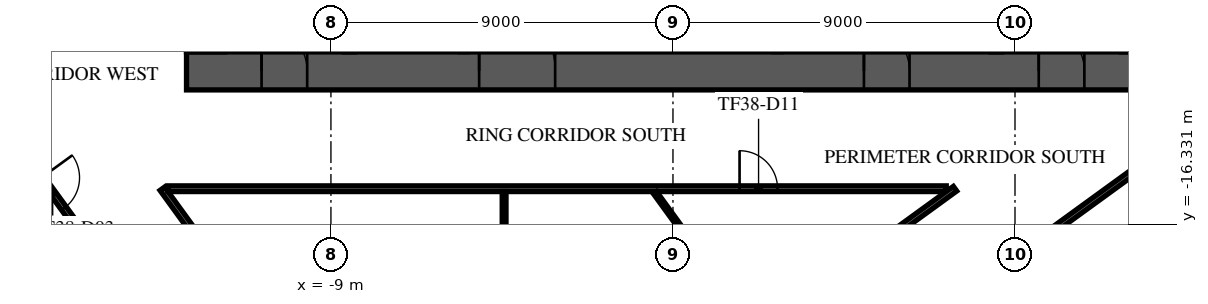
"""IFC4 building model, lengths in metres.
Left out: names, types, materials, properties, quantities, classifications, styles, units other than length and angle.
Written with IfcOpenShell. Run it as: python <this file> out.ifc"""

import sys

from ifc_helpers import new_model, si_unit, direction, frame, frame_2d, origin, place, context, subcontext, project, spatial, rectangle, extrude, element, fill, save


model = new_model("IFC4")
c1 = context("Model", 3, precision=1e-05, world=origin(), true_north=direction((0.0, 1.0)))
c2 = subcontext(c1, "Body", "Model", "MODEL_VIEW")
j1 = project(units=[si_unit("LENGTHUNIT", "METRE"), si_unit("PLANEANGLEUNIT", "RADIAN")], contexts=[c1])
p1 = place(None, origin())
s1 = spatial("IfcSite", under=j1, at=p1, CompositionType="ELEMENT")
p2 = place(p1, origin())
s2 = spatial("IfcBuilding", under=s1, at=p2, CompositionType="ELEMENT")
p3 = place(p2, frame((0.0, 0.0, 163.7)))
s3 = spatial("IfcBuildingStorey", under=s2, at=p3, CompositionType="ELEMENT", Elevation=163.7)
p4 = place(p3, frame((-12.8, -12.3, 0.0), z_axis=(0.0, 0.0, 1.0), x_axis=(1.0, 0.0, 0.0)))
e1 = element("IfcWall", 1, at=p4, inside=s3, PredefinedType="SHEAR", context=c2, shape_type="SweptSolid", body=[
    extrude(rectangle(XDim=25.6, YDim=1.0, at=frame_2d((12.8, 0.0))), origin(), (0.0, 0.0, 1.0), 3.6),
])
p5 = place(p4, frame((7.7, 0.0, 0.0)))
e2 = element("IfcOpeningElement", 2, at=p5, cuts=e1, PredefinedType="OPENING", context=c2, shape_type="SweptSolid", body=[
    extrude(rectangle(XDim=2.0, YDim=2.1, at=frame_2d((1.0, 1.05))), frame((0.0, 0.51, 0.0), z_axis=(0.0, -1.0, 0.0), x_axis=(1.0, 0.0, 0.0)), (0.0, 0.0, 1.0), 1.02),
])
p6 = place(p4, frame((17.825, 0.0, 0.0)))
e3 = element("IfcOpeningElement", 3, at=p6, cuts=e1, PredefinedType="OPENING", context=c2, shape_type="SweptSolid", body=[
    extrude(rectangle(XDim=1.2, YDim=2.1, at=frame_2d((0.6, 1.05))), frame((0.0, 0.51, 0.0), z_axis=(0.0, -1.0, 0.0), x_axis=(1.0, 0.0, 0.0)), (0.0, 0.0, 1.0), 1.02),
])
p7 = place(p4, frame((1.975, 0.0, 0.0)))
e4 = element("IfcOpeningElement", 4, at=p7, cuts=e1, PredefinedType="OPENING", context=c2, shape_type="SweptSolid", body=[
    extrude(rectangle(XDim=1.2, YDim=2.1, at=frame_2d((0.6, 1.05))), frame((0.0, 0.51, 0.0), z_axis=(0.0, -1.0, 0.0), x_axis=(1.0, 0.0, 0.0)), (0.0, 0.0, 1.0), 1.02),
])
p8 = place(p4, frame((22.425, 0.0, 0.0)))
e5 = element("IfcOpeningElement", 5, at=p8, cuts=e1, PredefinedType="OPENING", context=c2, shape_type="SweptSolid", body=[
    extrude(rectangle(XDim=1.2, YDim=2.1, at=frame_2d((0.6, 1.05))), frame((0.0, 0.51, 0.0), z_axis=(0.0, -1.0, 0.0), x_axis=(1.0, 0.0, 0.0)), (0.0, 0.0, 1.0), 1.02),
])
p9 = place(p3, frame((-36.533, -0.245, 0.0), z_axis=(0.0, 0.0, 1.0), x_axis=(0.587787495615, -0.809015364501, 0.0)))
e6 = element("IfcWall", 6, at=p9, inside=s3, PredefinedType="STANDARD", context=c2, shape_type="SweptSolid", body=[
    extrude(rectangle(XDim=42.552, YDim=0.6, at=frame_2d((21.276, 0.0))), origin(), (0.0, 0.0, 1.0), 3.6),
])
p10 = place(p9, frame((1.178, 0.0, 0.9)))
e7 = element("IfcOpeningElement", 7, at=p10, cuts=e6, PredefinedType="OPENING", context=c2, shape_type="SweptSolid", body=[
    extrude(rectangle(XDim=1.8, YDim=2.1, at=frame_2d((0.9, 1.05))), frame((0.0, 0.31, 0.0), z_axis=(0.0, -1.0, 0.0), x_axis=(1.0, 0.0, 0.0)), (0.0, 0.0, 1.0), 0.62),
])
p11 = place(p9, frame((5.396, 0.0, 0.9)))
e8 = element("IfcOpeningElement", 8, at=p11, cuts=e6, PredefinedType="OPENING", context=c2, shape_type="SweptSolid", body=[
    extrude(rectangle(XDim=1.8, YDim=2.1, at=frame_2d((0.9, 1.05))), frame((0.0, 0.31, 0.0), z_axis=(0.0, -1.0, 0.0), x_axis=(1.0, 0.0, 0.0)), (0.0, 0.0, 1.0), 0.62),
])
p12 = place(p9, frame((9.676, 0.0, 0.9)))
e9 = element("IfcOpeningElement", 9, at=p12, cuts=e6, PredefinedType="OPENING", context=c2, shape_type="SweptSolid", body=[
    extrude(rectangle(XDim=1.8, YDim=2.1, at=frame_2d((0.9, 1.05))), frame((0.0, 0.31, 0.0), z_axis=(0.0, -1.0, 0.0), x_axis=(1.0, 0.0, 0.0)), (0.0, 0.0, 1.0), 0.62),
])
p13 = place(p9, frame((13.956, 0.0, 0.9)))
e10 = element("IfcOpeningElement", 10, at=p13, cuts=e6, PredefinedType="OPENING", context=c2, shape_type="SweptSolid", body=[
    extrude(rectangle(XDim=1.8, YDim=2.1, at=frame_2d((0.9, 1.05))), frame((0.0, 0.31, 0.0), z_axis=(0.0, -1.0, 0.0), x_axis=(1.0, 0.0, 0.0)), (0.0, 0.0, 1.0), 0.62),
])
p14 = place(p9, frame((18.236, 0.0, 0.9)))
e11 = element("IfcOpeningElement", 11, at=p14, cuts=e6, PredefinedType="OPENING", context=c2, shape_type="SweptSolid", body=[
    extrude(rectangle(XDim=1.8, YDim=2.1, at=frame_2d((0.9, 1.05))), frame((0.0, 0.31, 0.0), z_axis=(0.0, -1.0, 0.0), x_axis=(1.0, 0.0, 0.0)), (0.0, 0.0, 1.0), 0.62),
])
p15 = place(p9, frame((22.516, 0.0, 0.9)))
e12 = element("IfcOpeningElement", 12, at=p15, cuts=e6, PredefinedType="OPENING", context=c2, shape_type="SweptSolid", body=[
    extrude(rectangle(XDim=1.8, YDim=2.1, at=frame_2d((0.9, 1.05))), frame((0.0, 0.31, 0.0), z_axis=(0.0, -1.0, 0.0), x_axis=(1.0, 0.0, 0.0)), (0.0, 0.0, 1.0), 0.62),
])
p16 = place(p9, frame((26.796, 0.0, 0.9)))
e13 = element("IfcOpeningElement", 13, at=p16, cuts=e6, PredefinedType="OPENING", context=c2, shape_type="SweptSolid", body=[
    extrude(rectangle(XDim=1.8, YDim=2.1, at=frame_2d((0.9, 1.05))), frame((0.0, 0.31, 0.0), z_axis=(0.0, -1.0, 0.0), x_axis=(1.0, 0.0, 0.0)), (0.0, 0.0, 1.0), 0.62),
])
p17 = place(p9, frame((31.076, 0.0, 0.9)))
e14 = element("IfcOpeningElement", 14, at=p17, cuts=e6, PredefinedType="OPENING", context=c2, shape_type="SweptSolid", body=[
    extrude(rectangle(XDim=1.8, YDim=2.1, at=frame_2d((0.9, 1.05))), frame((0.0, 0.31, 0.0), z_axis=(0.0, -1.0, 0.0), x_axis=(1.0, 0.0, 0.0)), (0.0, 0.0, 1.0), 0.62),
])
p18 = place(p9, frame((35.356, 0.0, 0.9)))
e15 = element("IfcOpeningElement", 15, at=p18, cuts=e6, PredefinedType="OPENING", context=c2, shape_type="SweptSolid", body=[
    extrude(rectangle(XDim=1.8, YDim=2.1, at=frame_2d((0.9, 1.05))), frame((0.0, 0.31, 0.0), z_axis=(0.0, -1.0, 0.0), x_axis=(1.0, 0.0, 0.0)), (0.0, 0.0, 1.0), 0.62),
])
p19 = place(p9, frame((39.573, 0.0, 0.9)))
e16 = element("IfcOpeningElement", 16, at=p19, cuts=e6, PredefinedType="OPENING", context=c2, shape_type="SweptSolid", body=[
    extrude(rectangle(XDim=1.8, YDim=2.1, at=frame_2d((0.9, 1.05))), frame((0.0, 0.31, 0.0), z_axis=(0.0, -1.0, 0.0), x_axis=(1.0, 0.0, 0.0)), (0.0, 0.0, 1.0), 0.62),
])
p20 = place(p3, frame((-4.784, -35.737, 0.0), z_axis=(0.0, 0.0, 1.0), x_axis=(0.809019283075, 0.587782102154, 0.0)))
e17 = element("IfcWall", 17, at=p20, inside=s3, PredefinedType="STANDARD", context=c2, shape_type="SweptSolid", body=[
    extrude(rectangle(XDim=49.751, YDim=0.6, at=frame_2d((24.875, 0.0))), origin(), (0.0, 0.0, 1.0), 3.6),
])
p21 = place(p20, frame((1.161, 0.0, 0.9)))
e18 = element("IfcOpeningElement", 18, at=p21, cuts=e17, PredefinedType="OPENING", context=c2, shape_type="SweptSolid", body=[
    extrude(rectangle(XDim=2.1, YDim=2.1, at=frame_2d((1.05, 1.05))), frame((0.0, 0.31, 0.0), z_axis=(0.0, -1.0, 0.0), x_axis=(1.0, 0.0, 0.0)), (0.0, 0.0, 1.0), 0.62),
])
p22 = place(p20, frame((5.644, 0.0, 0.9)))
e19 = element("IfcOpeningElement", 19, at=p22, cuts=e17, PredefinedType="OPENING", context=c2, shape_type="SweptSolid", body=[
    extrude(rectangle(XDim=2.1, YDim=2.1, at=frame_2d((1.05, 1.05))), frame((0.0, 0.31, 0.0), z_axis=(0.0, -1.0, 0.0), x_axis=(1.0, 0.0, 0.0)), (0.0, 0.0, 1.0), 0.62),
])
p23 = place(p20, frame((10.189, 0.0, 0.9)))
e20 = element("IfcOpeningElement", 20, at=p23, cuts=e17, PredefinedType="OPENING", context=c2, shape_type="SweptSolid", body=[
    extrude(rectangle(XDim=2.1, YDim=2.1, at=frame_2d((1.05, 1.05))), frame((0.0, 0.31, 0.0), z_axis=(0.0, -1.0, 0.0), x_axis=(1.0, 0.0, 0.0)), (0.0, 0.0, 1.0), 0.62),
])
p24 = place(p20, frame((14.735, 0.0, 0.9)))
e21 = element("IfcOpeningElement", 21, at=p24, cuts=e17, PredefinedType="OPENING", context=c2, shape_type="SweptSolid", body=[
    extrude(rectangle(XDim=2.1, YDim=2.1, at=frame_2d((1.05, 1.05))), frame((0.0, 0.31, 0.0), z_axis=(0.0, -1.0, 0.0), x_axis=(1.0, 0.0, 0.0)), (0.0, 0.0, 1.0), 0.62),
])
p25 = place(p20, frame((19.28, 0.0, 0.9)))
e22 = element("IfcOpeningElement", 22, at=p25, cuts=e17, PredefinedType="OPENING", context=c2, shape_type="SweptSolid", body=[
    extrude(rectangle(XDim=2.1, YDim=2.1, at=frame_2d((1.05, 1.05))), frame((0.0, 0.31, 0.0), z_axis=(0.0, -1.0, 0.0), x_axis=(1.0, 0.0, 0.0)), (0.0, 0.0, 1.0), 0.62),
])
p26 = place(p20, frame((23.826, 0.0, 0.9)))
e23 = element("IfcOpeningElement", 23, at=p26, cuts=e17, PredefinedType="OPENING", context=c2, shape_type="SweptSolid", body=[
    extrude(rectangle(XDim=2.1, YDim=2.1, at=frame_2d((1.05, 1.05))), frame((0.0, 0.31, 0.0), z_axis=(0.0, -1.0, 0.0), x_axis=(1.0, 0.0, 0.0)), (0.0, 0.0, 1.0), 0.62),
])
p27 = place(p20, frame((28.371, 0.0, 0.9)))
e24 = element("IfcOpeningElement", 24, at=p27, cuts=e17, PredefinedType="OPENING", context=c2, shape_type="SweptSolid", body=[
    extrude(rectangle(XDim=2.1, YDim=2.1, at=frame_2d((1.05, 1.05))), frame((0.0, 0.31, 0.0), z_axis=(0.0, -1.0, 0.0), x_axis=(1.0, 0.0, 0.0)), (0.0, 0.0, 1.0), 0.62),
])
p28 = place(p20, frame((32.917, 0.0, 0.9)))
e25 = element("IfcOpeningElement", 25, at=p28, cuts=e17, PredefinedType="OPENING", context=c2, shape_type="SweptSolid", body=[
    extrude(rectangle(XDim=2.1, YDim=2.1, at=frame_2d((1.05, 1.05))), frame((0.0, 0.31, 0.0), z_axis=(0.0, -1.0, 0.0), x_axis=(1.0, 0.0, 0.0)), (0.0, 0.0, 1.0), 0.62),
])
p29 = place(p20, frame((37.462, 0.0, 0.9)))
e26 = element("IfcOpeningElement", 26, at=p29, cuts=e17, PredefinedType="OPENING", context=c2, shape_type="SweptSolid", body=[
    extrude(rectangle(XDim=2.1, YDim=2.1, at=frame_2d((1.05, 1.05))), frame((0.0, 0.31, 0.0), z_axis=(0.0, -1.0, 0.0), x_axis=(1.0, 0.0, 0.0)), (0.0, 0.0, 1.0), 0.62),
])
p30 = place(p20, frame((42.008, 0.0, 0.9)))
e27 = element("IfcOpeningElement", 27, at=p30, cuts=e17, PredefinedType="OPENING", context=c2, shape_type="SweptSolid", body=[
    extrude(rectangle(XDim=2.1, YDim=2.1, at=frame_2d((1.05, 1.05))), frame((0.0, 0.31, 0.0), z_axis=(0.0, -1.0, 0.0), x_axis=(1.0, 0.0, 0.0)), (0.0, 0.0, 1.0), 0.62),
])
p31 = place(p20, frame((46.491, 0.0, 0.9)))
e28 = element("IfcOpeningElement", 28, at=p31, cuts=e17, PredefinedType="OPENING", context=c2, shape_type="SweptSolid", body=[
    extrude(rectangle(XDim=2.1, YDim=2.1, at=frame_2d((1.05, 1.05))), frame((0.0, 0.31, 0.0), z_axis=(0.0, -1.0, 0.0), x_axis=(1.0, 0.0, 0.0)), (0.0, 0.0, 1.0), 0.62),
])
p32 = place(p3, frame((-26.437, -1.589, 0.0), z_axis=(0.0, 0.0, 1.0), x_axis=(0.587768879666, -0.809028889531, 0.0)))
e29 = element("IfcWall", 29, at=p32, inside=s3, PredefinedType="PARTITIONING", context=c2, shape_type="SweptSolid", body=[
    extrude(rectangle(XDim=28.583, YDim=0.15, at=frame_2d((14.292, 0.0))), origin(), (0.0, 0.0, 1.0), 3.15),
])
p33 = place(p32, frame((16.711, 0.0, 0.0)))
e30 = element("IfcOpeningElement", 30, at=p33, cuts=e29, PredefinedType="OPENING", context=c2, shape_type="SweptSolid", body=[
    extrude(rectangle(XDim=1.0, YDim=2.1, at=frame_2d((0.5, 1.05))), frame((0.0, 0.085, 0.0), z_axis=(0.0, -1.0, 0.0), x_axis=(1.0, 0.0, 0.0)), (0.0, 0.0, 1.0), 0.17),
])
p34 = place(p3, frame((-13.436, -15.4, 0.0), z_axis=(0.0, 0.0, 1.0), x_axis=(0.58776885963, -0.809028904088, 0.0)))
e31 = element("IfcWall", 31, at=p34, inside=s3, PredefinedType="PARTITIONING", context=c2, shape_type="SweptSolid", body=[
    extrude(rectangle(XDim=9.767, YDim=0.15, at=frame_2d((4.884, 0.0))), origin(), (0.0, 0.0, 1.0), 3.15),
])
p35 = place(p34, frame((4.3, 0.0, 0.0)))
e32 = element("IfcOpeningElement", 32, at=p35, cuts=e31, PredefinedType="OPENING", context=c2, shape_type="SweptSolid", body=[
    extrude(rectangle(XDim=1.8, YDim=2.1, at=frame_2d((0.9, 1.05))), frame((0.0, 0.085, 0.0), z_axis=(0.0, -1.0, 0.0), x_axis=(1.0, 0.0, 0.0)), (0.0, 0.0, 1.0), 0.17),
])
p36 = place(p3, frame((-13.289, -15.4, 0.0), z_axis=(0.0, 0.0, 1.0), x_axis=(1.0, 0.0, 0.0)))
e33 = element("IfcWall", 33, at=p36, inside=s3, PredefinedType="PARTITIONING", context=c2, shape_type="SweptSolid", body=[
    extrude(rectangle(XDim=20.48, YDim=0.15, at=frame_2d((10.24, 0.0))), origin(), (0.0, 0.0, 1.0), 3.15),
])
p37 = place(p36, frame((15.041, 0.0, 0.0)))
e34 = element("IfcOpeningElement", 34, at=p37, cuts=e33, PredefinedType="OPENING", context=c2, shape_type="SweptSolid", body=[
    extrude(rectangle(XDim=1.0, YDim=2.1, at=frame_2d((0.5, 1.05))), frame((0.0, 0.085, 0.0), z_axis=(0.0, -1.0, 0.0), x_axis=(1.0, 0.0, 0.0)), (0.0, 0.0, 1.0), 0.17),
])
p38 = place(p3, frame((-4.98, -24.411, 0.0), z_axis=(0.0, 0.0, 1.0), x_axis=(0.809006648498, 0.587799491907, 0.0)))
e35 = element("IfcWall", 35, at=p38, inside=s3, PredefinedType="PARTITIONING", context=c2, shape_type="SweptSolid", body=[
    extrude(rectangle(XDim=15.33, YDim=0.15, at=frame_2d((7.665, 0.0))), origin(), (0.0, 0.0, 1.0), 3.15),
])
p39 = place(p38, frame((7.464, 0.0, 0.0)))
e36 = element("IfcOpeningElement", 36, at=p39, cuts=e35, PredefinedType="OPENING", context=c2, shape_type="SweptSolid", body=[
    extrude(rectangle(XDim=1.0, YDim=2.1, at=frame_2d((0.5, 1.05))), frame((0.0, 0.085, 0.0), z_axis=(0.0, -1.0, 0.0), x_axis=(1.0, 0.0, 0.0)), (0.0, 0.0, 1.0), 0.17),
])
p40 = place(p3, frame((-3.509, -26.309, 0.0), z_axis=(0.0, 0.0, 1.0), x_axis=(0.809024097608, 0.587775475407, 0.0)))
e37 = element("IfcWall", 37, at=p40, inside=s3, PredefinedType="PARTITIONING", context=c2, shape_type="SweptSolid", body=[
    extrude(rectangle(XDim=36.68, YDim=0.15, at=frame_2d((18.34, 0.0))), origin(), (0.0, 0.0, 1.0), 3.15),
])
p41 = place(p40, frame((5.361, 0.0, 0.0)))
e38 = element("IfcOpeningElement", 38, at=p41, cuts=e37, PredefinedType="OPENING", context=c2, shape_type="SweptSolid", body=[
    extrude(rectangle(XDim=1.0, YDim=2.1, at=frame_2d((0.5, 1.05))), frame((0.0, 0.085, 0.0), z_axis=(0.0, -1.0, 0.0), x_axis=(1.0, 0.0, 0.0)), (0.0, 0.0, 1.0), 0.17),
])
p42 = place(p40, frame((12.913, 0.0, 0.0)))
e39 = element("IfcOpeningElement", 39, at=p42, cuts=e37, PredefinedType="OPENING", context=c2, shape_type="SweptSolid", body=[
    extrude(rectangle(XDim=1.0, YDim=2.1, at=frame_2d((0.5, 1.05))), frame((0.0, 0.085, 0.0), z_axis=(0.0, -1.0, 0.0), x_axis=(1.0, 0.0, 0.0)), (0.0, 0.0, 1.0), 0.17),
])
p43 = place(p40, frame((27.576, 0.0, 0.0)))
e40 = element("IfcOpeningElement", 40, at=p43, cuts=e37, PredefinedType="OPENING", context=c2, shape_type="SweptSolid", body=[
    extrude(rectangle(XDim=1.0, YDim=2.1, at=frame_2d((0.5, 1.05))), frame((0.0, 0.085, 0.0), z_axis=(0.0, -1.0, 0.0), x_axis=(1.0, 0.0, 0.0)), (0.0, 0.0, 1.0), 0.17),
])
p44 = place(p3, frame((-4.443, -23.892, 0.0), z_axis=(0.0, 0.0, 1.0), x_axis=(0.0, 1.0, 0.0)))
e41 = element("IfcWall", 41, at=p44, inside=s3, PredefinedType="PARTITIONING", context=c2, shape_type="SweptSolid", body=[
    extrude(rectangle(XDim=8.417, YDim=0.1, at=frame_2d((4.208, 0.0))), origin(), (0.0, 0.0, 1.0), 3.6),
])
p45 = place(p3, frame((-0.472, -15.504, 0.0), z_axis=(0.0, 0.0, 1.0), x_axis=(0.587831486694, -0.808983401097, 0.0)))
e42 = element("IfcWall", 42, at=p45, inside=s3, PredefinedType="PARTITIONING", context=c2, shape_type="SweptSolid", body=[
    extrude(rectangle(XDim=4.481, YDim=0.1, at=frame_2d((2.24, 0.0))), origin(), (0.0, 0.0, 1.0), 3.15),
])
p46 = place(p5, origin())
e43 = element("IfcDoor", 43, at=p46, inside=s3, OperationType="SINGLE_SWING_LEFT", PredefinedType="DOOR", context=c2, shape_type="SweptSolid", body=[
    extrude(rectangle(XDim=2.0, YDim=2.1, at=frame_2d((1.0, 1.05))), frame((0.0, 0.025, 0.0), z_axis=(0.0, -1.0, 0.0), x_axis=(1.0, 0.0, 0.0)), (0.0, 0.0, 1.0), 0.05),
])
fill(e2, e43)
p47 = place(p6, origin())
e44 = element("IfcDoor", 44, at=p47, inside=s3, OperationType="SINGLE_SWING_LEFT", PredefinedType="DOOR", context=c2, shape_type="SweptSolid", body=[
    extrude(rectangle(XDim=1.2, YDim=2.1, at=frame_2d((0.6, 1.05))), frame((0.0, 0.025, 0.0), z_axis=(0.0, -1.0, 0.0), x_axis=(1.0, 0.0, 0.0)), (0.0, 0.0, 1.0), 0.05),
])
fill(e3, e44)
p48 = place(p7, origin())
e45 = element("IfcDoor", 45, at=p48, inside=s3, OperationType="SINGLE_SWING_LEFT", PredefinedType="DOOR", context=c2, shape_type="SweptSolid", body=[
    extrude(rectangle(XDim=1.2, YDim=2.1, at=frame_2d((0.6, 1.05))), frame((0.0, 0.025, 0.0), z_axis=(0.0, -1.0, 0.0), x_axis=(1.0, 0.0, 0.0)), (0.0, 0.0, 1.0), 0.05),
])
fill(e4, e45)
p49 = place(p8, origin())
e46 = element("IfcDoor", 46, at=p49, inside=s3, OperationType="SINGLE_SWING_LEFT", PredefinedType="DOOR", context=c2, shape_type="SweptSolid", body=[
    extrude(rectangle(XDim=1.2, YDim=2.1, at=frame_2d((0.6, 1.05))), frame((0.0, 0.025, 0.0), z_axis=(0.0, -1.0, 0.0), x_axis=(1.0, 0.0, 0.0)), (0.0, 0.0, 1.0), 0.05),
])
fill(e5, e46)
p50 = place(p33, frame((1.0, 0.0, 0.0), z_axis=(0.0, 0.0, 1.0), x_axis=(-1.0, 0.0, 0.0)))
e47 = element("IfcDoor", 47, at=p50, inside=s3, OperationType="SINGLE_SWING_LEFT", PredefinedType="DOOR", context=c2, shape_type="SweptSolid", body=[
    extrude(rectangle(XDim=1.0, YDim=2.1, at=frame_2d((0.5, 1.05))), frame((0.0, 0.025, 0.0), z_axis=(0.0, -1.0, 0.0), x_axis=(1.0, 0.0, 0.0)), (0.0, 0.0, 1.0), 0.05),
])
fill(e30, e47)
p51 = place(p37, frame((1.0, 0.0, 0.0), z_axis=(0.0, 0.0, 1.0), x_axis=(-1.0, 0.0, 0.0)))
e48 = element("IfcDoor", 48, at=p51, inside=s3, OperationType="SINGLE_SWING_LEFT", PredefinedType="DOOR", context=c2, shape_type="SweptSolid", body=[
    extrude(rectangle(XDim=1.0, YDim=2.1, at=frame_2d((0.5, 1.05))), frame((0.0, 0.025, 0.0), z_axis=(0.0, -1.0, 0.0), x_axis=(1.0, 0.0, 0.0)), (0.0, 0.0, 1.0), 0.05),
])
fill(e34, e48)
save(model, sys.argv[1])
